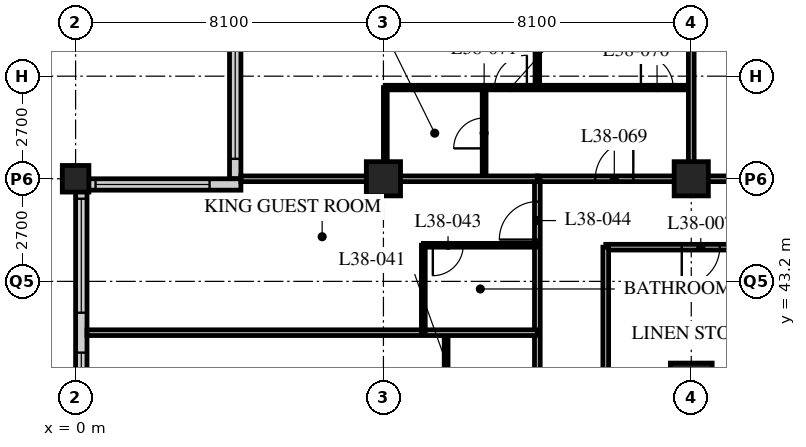
"""IFC4 building model, lengths in metres.
Left out: names, types, materials, properties, quantities, classifications, styles, units other than length and angle.
Written with IfcOpenShell. Run it as: python <this file> out.ifc"""

import sys

from ifc_helpers import new_model, si_unit, direction, frame, frame_2d, origin, origin_2d, place, context, subcontext, project, spatial, rectangle, hollow_rectangle, extrude, element, fill, save


model = new_model("IFC4")
c1 = context("Model", 3, precision=1e-05, world=origin(), true_north=direction((0.0, 1.0)))
c2 = subcontext(c1, "Body", "Model", "MODEL_VIEW")
j1 = project(units=[si_unit("LENGTHUNIT", "METRE"), si_unit("PLANEANGLEUNIT", "RADIAN")], contexts=[c1])
p1 = place(None, origin())
s1 = spatial("IfcSite", under=j1, at=p1, CompositionType="ELEMENT")
p2 = place(p1, origin())
s2 = spatial("IfcBuilding", under=s1, at=p2, CompositionType="ELEMENT")
p3 = place(p2, frame((0.0, 0.0, 147.6)))
s3 = spatial("IfcBuildingStorey", under=s2, at=p3, CompositionType="ELEMENT", Elevation=147.6)
p4 = place(p3, frame((0.0, 45.9, 0.0), z_axis=(0.0, 0.0, 1.0), x_axis=(1.0, 0.0, 0.0)))
e1 = element("IfcColumn", 1, at=p4, inside=s3, PredefinedType="COLUMN", context=c2, shape_type="SweptSolid", body=[
    extrude(hollow_rectangle(XDim=0.7, YDim=0.7, WallThickness=0.07, at=origin_2d()), origin(), (0.0, 0.0, 1.0), 3.4),
])
p5 = place(p3, frame((8.1, 45.9, 0.0), z_axis=(0.0, 0.0, 1.0), x_axis=(1.0, 0.0, 0.0)))
e2 = element("IfcColumn", 2, at=p5, inside=s3, PredefinedType="COLUMN", context=c2, shape_type="SweptSolid", body=[
    extrude(hollow_rectangle(XDim=0.9, YDim=0.9, WallThickness=0.1, at=origin_2d()), origin(), (0.0, 0.0, 1.0), 3.4),
])
p6 = place(p3, frame((16.2, 40.5, 0.0), z_axis=(0.0, 0.0, 1.0), x_axis=(1.0, 0.0, 0.0)))
e3 = element("IfcColumn", 3, at=p6, inside=s3, PredefinedType="COLUMN", context=c2, shape_type="SweptSolid", body=[
    extrude(hollow_rectangle(XDim=1.1, YDim=1.1, WallThickness=0.1, at=origin_2d()), origin(), (0.0, 0.0, 1.0), 3.4),
])
p7 = place(p3, frame((16.2, 45.9, 0.0), z_axis=(0.0, 0.0, 1.0), x_axis=(1.0, 0.0, 0.0)))
e4 = element("IfcColumn", 4, at=p7, inside=s3, PredefinedType="COLUMN", context=c2, shape_type="SweptSolid", body=[
    extrude(hollow_rectangle(XDim=0.9, YDim=0.9, WallThickness=0.1, at=origin_2d()), origin(), (0.0, 0.0, 1.0), 3.4),
])
p8 = place(p3, frame((4.2, 49.65, 0.0), z_axis=(0.0, 0.0, 1.0), x_axis=(0.0, -1.0, 0.0)))
e5 = element("IfcWall", 5, at=p8, inside=s3, PredefinedType="SOLIDWALL", context=c2, shape_type="SweptSolid", body=[
    extrude(rectangle(XDim=3.75, YDim=0.3, at=frame_2d((1.875, 0.0))), origin(), (0.0, 0.0, 1.0), 3.19),
])
p9 = place(p8, frame((0.225, 0.0, 0.9)))
e6 = element("IfcOpeningElement", 6, at=p9, cuts=e5, PredefinedType="OPENING", context=c2, shape_type="SweptSolid", body=[
    extrude(rectangle(XDim=3.0, YDim=1.4, at=frame_2d((1.5, 0.7))), frame((0.0, 0.16, 0.0), z_axis=(0.0, -1.0, 0.0), x_axis=(1.0, 0.0, 0.0)), (0.0, 0.0, 1.0), 0.32),
])
p10 = place(p3, frame((4.35, 45.75, 0.0), z_axis=(0.0, 0.0, 1.0), x_axis=(-1.0, 0.0, 0.0)))
e7 = element("IfcWall", 7, at=p10, inside=s3, PredefinedType="SOLIDWALL", context=c2, shape_type="SweptSolid", body=[
    extrude(rectangle(XDim=4.35, YDim=0.3, at=frame_2d((2.175, 0.0))), origin(), (0.0, 0.0, 1.0), 3.19),
])
p11 = place(p10, frame((0.825, 0.0, 0.9)))
e8 = element("IfcOpeningElement", 8, at=p11, cuts=e7, PredefinedType="OPENING", context=c2, shape_type="SweptSolid", body=[
    extrude(rectangle(XDim=3.0, YDim=1.4, at=frame_2d((1.5, 0.7))), frame((0.0, 0.16, 0.0), z_axis=(0.0, -1.0, 0.0), x_axis=(1.0, 0.0, 0.0)), (0.0, 0.0, 1.0), 0.32),
])
p12 = place(p3, frame((0.15, 45.6, 0.0), z_axis=(0.0, 0.0, 1.0), x_axis=(0.0, -1.0, 0.0)))
e9 = element("IfcWall", 9, at=p12, inside=s3, PredefinedType="SOLIDWALL", context=c2, shape_type="SweptSolid", body=[
    extrude(rectangle(XDim=32.1, YDim=0.3, at=frame_2d((16.05, 0.0))), origin(), (0.0, 0.0, 1.0), 3.19),
])
p13 = place(p12, frame((0.225, 0.0, 0.9)))
e10 = element("IfcOpeningElement", 10, at=p13, cuts=e9, PredefinedType="OPENING", context=c2, shape_type="SweptSolid", body=[
    extrude(rectangle(XDim=3.0, YDim=1.4, at=frame_2d((1.5, 0.7))), frame((0.0, 0.16, 0.0), z_axis=(0.0, -1.0, 0.0), x_axis=(1.0, 0.0, 0.0)), (0.0, 0.0, 1.0), 0.32),
])
p14 = place(p12, frame((4.275, 0.0, 0.9)))
e11 = element("IfcOpeningElement", 11, at=p14, cuts=e9, PredefinedType="OPENING", context=c2, shape_type="SweptSolid", body=[
    extrude(rectangle(XDim=3.0, YDim=1.4, at=frame_2d((1.5, 0.7))), frame((0.0, 0.16, 0.0), z_axis=(0.0, -1.0, 0.0), x_axis=(1.0, 0.0, 0.0)), (0.0, 0.0, 1.0), 0.32),
])
p15 = place(p12, frame((8.325, 0.0, 0.9)))
e12 = element("IfcOpeningElement", 12, at=p15, cuts=e9, PredefinedType="OPENING", context=c2, shape_type="SweptSolid", body=[
    extrude(rectangle(XDim=3.0, YDim=1.4, at=frame_2d((1.5, 0.7))), frame((0.0, 0.16, 0.0), z_axis=(0.0, -1.0, 0.0), x_axis=(1.0, 0.0, 0.0)), (0.0, 0.0, 1.0), 0.32),
])
p16 = place(p12, frame((12.375, 0.0, 0.9)))
e13 = element("IfcOpeningElement", 13, at=p16, cuts=e9, PredefinedType="OPENING", context=c2, shape_type="SweptSolid", body=[
    extrude(rectangle(XDim=3.0, YDim=1.4, at=frame_2d((1.5, 0.7))), frame((0.0, 0.16, 0.0), z_axis=(0.0, -1.0, 0.0), x_axis=(1.0, 0.0, 0.0)), (0.0, 0.0, 1.0), 0.32),
])
p17 = place(p12, frame((16.425, 0.0, 0.9)))
e14 = element("IfcOpeningElement", 14, at=p17, cuts=e9, PredefinedType="OPENING", context=c2, shape_type="SweptSolid", body=[
    extrude(rectangle(XDim=3.0, YDim=1.4, at=frame_2d((1.5, 0.7))), frame((0.0, 0.16, 0.0), z_axis=(0.0, -1.0, 0.0), x_axis=(1.0, 0.0, 0.0)), (0.0, 0.0, 1.0), 0.32),
])
p18 = place(p12, frame((20.475, 0.0, 0.9)))
e15 = element("IfcOpeningElement", 15, at=p18, cuts=e9, PredefinedType="OPENING", context=c2, shape_type="SweptSolid", body=[
    extrude(rectangle(XDim=3.0, YDim=1.4, at=frame_2d((1.5, 0.7))), frame((0.0, 0.16, 0.0), z_axis=(0.0, -1.0, 0.0), x_axis=(1.0, 0.0, 0.0)), (0.0, 0.0, 1.0), 0.32),
])
p19 = place(p12, frame((24.525, 0.0, 0.9)))
e16 = element("IfcOpeningElement", 16, at=p19, cuts=e9, PredefinedType="OPENING", context=c2, shape_type="SweptSolid", body=[
    extrude(rectangle(XDim=3.0, YDim=1.4, at=frame_2d((1.5, 0.7))), frame((0.0, 0.16, 0.0), z_axis=(0.0, -1.0, 0.0), x_axis=(1.0, 0.0, 0.0)), (0.0, 0.0, 1.0), 0.32),
])
p20 = place(p12, frame((28.575, 0.0, 0.9)))
e17 = element("IfcOpeningElement", 17, at=p20, cuts=e9, PredefinedType="OPENING", context=c2, shape_type="SweptSolid", body=[
    extrude(rectangle(XDim=3.0, YDim=1.4, at=frame_2d((1.5, 0.7))), frame((0.0, 0.16, 0.0), z_axis=(0.0, -1.0, 0.0), x_axis=(1.0, 0.0, 0.0)), (0.0, 0.0, 1.0), 0.32),
])
p21 = place(p3, frame((12.15, 45.9, 0.0), z_axis=(0.0, 0.0, 1.0), x_axis=(1.0, 0.0, 0.0)))
e18 = element("IfcWall", 18, at=p21, inside=s3, PredefinedType="PARTITIONING", context=c2, shape_type="SweptSolid", body=[
    extrude(rectangle(XDim=36.45, YDim=0.15, at=frame_2d((18.225, 0.0))), origin(), (0.0, 0.0, 1.0), 2.42),
])
p22 = place(p21, frame((9.225, 0.0, 0.0)))
e19 = element("IfcOpeningElement", 19, at=p22, cuts=e18, PredefinedType="OPENING", context=c2, shape_type="SweptSolid", body=[
    extrude(rectangle(XDim=1.8, YDim=2.4, at=frame_2d((0.9, 1.2))), frame((0.0, 0.085, 0.0), z_axis=(0.0, -1.0, 0.0), x_axis=(1.0, 0.0, 0.0)), (0.0, 0.0, 1.0), 0.17),
])
p23 = place(p21, frame((21.65, 0.0, 0.0)))
e20 = element("IfcOpeningElement", 20, at=p23, cuts=e18, PredefinedType="OPENING", context=c2, shape_type="SweptSolid", body=[
    extrude(rectangle(XDim=1.0, YDim=2.1, at=frame_2d((0.5, 1.05))), frame((0.0, 0.085, 0.0), z_axis=(0.0, -1.0, 0.0), x_axis=(1.0, 0.0, 0.0)), (0.0, 0.0, 1.0), 0.17),
])
p24 = place(p21, frame((24.9, 0.0, 0.0)))
e21 = element("IfcOpeningElement", 21, at=p24, cuts=e18, PredefinedType="OPENING", context=c2, shape_type="SweptSolid", body=[
    extrude(rectangle(XDim=1.0, YDim=2.1, at=frame_2d((0.5, 1.05))), frame((0.0, 0.085, 0.0), z_axis=(0.0, -1.0, 0.0), x_axis=(1.0, 0.0, 0.0)), (0.0, 0.0, 1.0), 0.17),
])
p25 = place(p21, frame((30.8, 0.0, 0.0)))
e22 = element("IfcOpeningElement", 22, at=p25, cuts=e18, PredefinedType="OPENING", context=c2, shape_type="SweptSolid", body=[
    extrude(rectangle(XDim=1.0, YDim=2.1, at=frame_2d((0.5, 1.05))), frame((0.0, 0.085, 0.0), z_axis=(0.0, -1.0, 0.0), x_axis=(1.0, 0.0, 0.0)), (0.0, 0.0, 1.0), 0.17),
])
p26 = place(p21, frame((32.825, 0.0, 0.0)))
e23 = element("IfcOpeningElement", 23, at=p26, cuts=e18, PredefinedType="OPENING", context=c2, shape_type="SweptSolid", body=[
    extrude(rectangle(XDim=1.0, YDim=2.1, at=frame_2d((0.5, 1.05))), frame((0.0, 0.085, 0.0), z_axis=(0.0, -1.0, 0.0), x_axis=(1.0, 0.0, 0.0)), (0.0, 0.0, 1.0), 0.17),
])
p27 = place(p21, frame((1.525, 0.0, 0.0)))
e24 = element("IfcOpeningElement", 24, at=p27, cuts=e18, PredefinedType="OPENING", context=c2, shape_type="SweptSolid", body=[
    extrude(rectangle(XDim=1.0, YDim=2.1, at=frame_2d((0.5, 1.05))), frame((0.0, 0.085, 0.0), z_axis=(0.0, -1.0, 0.0), x_axis=(1.0, 0.0, 0.0)), (0.0, 0.0, 1.0), 0.17),
])
p28 = place(p3, frame((12.15, 21.6, 0.0), z_axis=(0.0, 0.0, 1.0), x_axis=(0.0, 1.0, 0.0)))
e25 = element("IfcWall", 25, at=p28, inside=s3, PredefinedType="PARTITIONING", context=c2, shape_type="SweptSolid", body=[
    extrude(rectangle(XDim=24.3, YDim=0.15, at=frame_2d((12.15, 0.0))), origin(), (0.0, 0.0, 1.0), 3.19),
])
p29 = place(p28, frame((5.575, 0.0, 0.0)))
e26 = element("IfcOpeningElement", 26, at=p29, cuts=e25, PredefinedType="OPENING", context=c2, shape_type="SweptSolid", body=[
    extrude(rectangle(XDim=1.0, YDim=2.1, at=frame_2d((0.5, 1.05))), frame((0.0, 0.085, 0.0), z_axis=(0.0, -1.0, 0.0), x_axis=(1.0, 0.0, 0.0)), (0.0, 0.0, 1.0), 0.17),
])
p30 = place(p28, frame((14.05, 0.0, 0.0)))
e27 = element("IfcOpeningElement", 27, at=p30, cuts=e25, PredefinedType="OPENING", context=c2, shape_type="SweptSolid", body=[
    extrude(rectangle(XDim=1.0, YDim=2.1, at=frame_2d((0.5, 1.05))), frame((0.0, 0.085, 0.0), z_axis=(0.0, -1.0, 0.0), x_axis=(1.0, 0.0, 0.0)), (0.0, 0.0, 1.0), 0.17),
])
p31 = place(p28, frame((22.7, 0.0, 0.0)))
e28 = element("IfcOpeningElement", 28, at=p31, cuts=e25, PredefinedType="OPENING", context=c2, shape_type="SweptSolid", body=[
    extrude(rectangle(XDim=1.0, YDim=2.1, at=frame_2d((0.5, 1.05))), frame((0.0, 0.085, 0.0), z_axis=(0.0, -1.0, 0.0), x_axis=(1.0, 0.0, 0.0)), (0.0, 0.0, 1.0), 0.17),
])
p32 = place(p3, frame((27.14, 44.1, 0.0), z_axis=(0.0, 0.0, 1.0), x_axis=(-1.0, 0.0, 0.0)))
e29 = element("IfcWall", 29, at=p32, inside=s3, PredefinedType="PARTITIONING", context=c2, shape_type="SweptSolid", body=[
    extrude(rectangle(XDim=13.19, YDim=0.15, at=frame_2d((6.595, 0.0))), origin(), (0.0, 0.0, 1.0), 3.19),
])
p33 = place(p32, frame((10.19, 0.0, 0.0)))
e30 = element("IfcOpeningElement", 30, at=p33, cuts=e29, PredefinedType="OPENING", context=c2, shape_type="SweptSolid", body=[
    extrude(rectangle(XDim=1.0, YDim=2.1, at=frame_2d((0.5, 1.05))), frame((0.0, 0.085, 0.0), z_axis=(0.0, -1.0, 0.0), x_axis=(1.0, 0.0, 0.0)), (0.0, 0.0, 1.0), 0.17),
])
p34 = place(p32, frame((3.59, 0.0, 0.0)))
e31 = element("IfcOpeningElement", 31, at=p34, cuts=e29, PredefinedType="OPENING", context=c2, shape_type="SweptSolid", body=[
    extrude(rectangle(XDim=1.0, YDim=2.1, at=frame_2d((0.5, 1.05))), frame((0.0, 0.085, 0.0), z_axis=(0.0, -1.0, 0.0), x_axis=(1.0, 0.0, 0.0)), (0.0, 0.0, 1.0), 0.17),
])
p35 = place(p3, frame((13.95, 44.1, 0.0), z_axis=(0.0, 0.0, 1.0), x_axis=(0.0, -1.0, 0.0)))
e32 = element("IfcWall", 32, at=p35, inside=s3, PredefinedType="PARTITIONING", context=c2, shape_type="SweptSolid", body=[
    extrude(rectangle(XDim=19.8, YDim=0.15, at=frame_2d((9.9, 0.0))), origin(), (0.0, 0.0, 1.0), 3.19),
])
p36 = place(p35, frame((15.25, 0.0, 0.0)))
e33 = element("IfcOpeningElement", 33, at=p36, cuts=e32, PredefinedType="OPENING", context=c2, shape_type="SweptSolid", body=[
    extrude(rectangle(XDim=1.0, YDim=2.1, at=frame_2d((0.5, 1.05))), frame((0.0, 0.085, 0.0), z_axis=(0.0, -1.0, 0.0), x_axis=(1.0, 0.0, 0.0)), (0.0, 0.0, 1.0), 0.17),
])
p37 = place(p35, frame((7.15, 0.0, 0.0)))
e34 = element("IfcOpeningElement", 34, at=p37, cuts=e32, PredefinedType="OPENING", context=c2, shape_type="SweptSolid", body=[
    extrude(rectangle(XDim=1.0, YDim=2.1, at=frame_2d((0.5, 1.05))), frame((0.0, 0.085, 0.0), z_axis=(0.0, -1.0, 0.0), x_axis=(1.0, 0.0, 0.0)), (0.0, 0.0, 1.0), 0.17),
])
p38 = place(p3, frame((9.75, 39.25, 0.0), z_axis=(0.0, 0.0, 1.0), x_axis=(0.0, 1.0, 0.0)))
e35 = element("IfcWall", 35, at=p38, inside=s3, PredefinedType="PARTITIONING", context=c2, shape_type="SweptSolid", body=[
    extrude(rectangle(XDim=2.6, YDim=0.1, at=frame_2d((1.3, 0.0))), origin(), (0.0, 0.0, 1.0), 3.19),
])
p39 = place(p3, frame((12.15, 41.85, 0.0), z_axis=(0.0, 0.0, 1.0), x_axis=(-1.0, 0.0, 0.0)))
e36 = element("IfcWall", 36, at=p39, inside=s3, PredefinedType="PARTITIONING", context=c2, shape_type="SweptSolid", body=[
    extrude(rectangle(XDim=11.85, YDim=0.15, at=frame_2d((5.925, 0.0))), origin(), (0.0, 0.0, 1.0), 3.19),
])
p40 = place(p3, frame((9.15, 41.85, 0.0), z_axis=(0.0, 0.0, 1.0), x_axis=(0.0, 1.0, 0.0)))
e37 = element("IfcWall", 37, at=p40, inside=s3, PredefinedType="PARTITIONING", context=c2, shape_type="SweptSolid", body=[
    extrude(rectangle(XDim=2.3, YDim=0.1, at=frame_2d((1.15, 0.0))), origin(), (0.0, 0.0, 1.0), 3.19),
])
p41 = place(p3, frame((12.15, 44.15, 0.0), z_axis=(0.0, 0.0, 1.0), x_axis=(-1.0, 0.0, 0.0)))
e38 = element("IfcWall", 38, at=p41, inside=s3, PredefinedType="PARTITIONING", context=c2, shape_type="SweptSolid", body=[
    extrude(rectangle(XDim=3.0, YDim=0.1, at=frame_2d((1.5, 0.0))), origin(), (0.0, 0.0, 1.0), 3.19),
])
p42 = place(p41, frame((1.95, 0.0, 0.0)))
e39 = element("IfcOpeningElement", 39, at=p42, cuts=e38, PredefinedType="OPENING", context=c2, shape_type="SweptSolid", body=[
    extrude(rectangle(XDim=0.8, YDim=2.1, at=frame_2d((0.4, 1.05))), frame((0.0, 0.06, 0.0), z_axis=(0.0, -1.0, 0.0), x_axis=(1.0, 0.0, 0.0)), (0.0, 0.0, 1.0), 0.12),
])
p43 = place(p3, frame((10.75, 45.9, 0.0), z_axis=(0.0, 0.0, 1.0), x_axis=(0.0, 1.0, 0.0)))
e40 = element("IfcWall", 40, at=p43, inside=s3, PredefinedType="PARTITIONING", context=c2, shape_type="SweptSolid", body=[
    extrude(rectangle(XDim=2.4, YDim=0.1, at=frame_2d((1.2, 0.0))), origin(), (0.0, 0.0, 1.0), 3.19),
])
p44 = place(p43, frame((0.8, 0.0, 0.0)))
e41 = element("IfcOpeningElement", 41, at=p44, cuts=e40, PredefinedType="OPENING", context=c2, shape_type="SweptSolid", body=[
    extrude(rectangle(XDim=0.8, YDim=2.1, at=frame_2d((0.4, 1.05))), frame((0.0, 0.06, 0.0), z_axis=(0.0, -1.0, 0.0), x_axis=(1.0, 0.0, 0.0)), (0.0, 0.0, 1.0), 0.12),
])
p45 = place(p3, frame((8.15, 45.9, 0.0), z_axis=(0.0, 0.0, 1.0), x_axis=(0.0, 1.0, 0.0)))
e42 = element("IfcWall", 42, at=p45, inside=s3, PredefinedType="PARTITIONING", context=c2, shape_type="SweptSolid", body=[
    extrude(rectangle(XDim=2.4, YDim=0.1, at=frame_2d((1.2, 0.0))), origin(), (0.0, 0.0, 1.0), 2.42),
])
p46 = place(p3, frame((8.15, 48.3, 0.0), z_axis=(0.0, 0.0, 1.0), x_axis=(1.0, 0.0, 0.0)))
e43 = element("IfcWall", 43, at=p46, inside=s3, PredefinedType="PARTITIONING", context=c2, shape_type="SweptSolid", body=[
    extrude(rectangle(XDim=8.05, YDim=0.12, at=frame_2d((4.025, 0.0))), origin(), (0.0, 0.0, 1.0), 3.19),
])
p47 = place(p46, frame((6.725, 0.0, 0.0)))
e44 = element("IfcOpeningElement", 44, at=p47, cuts=e43, PredefinedType="OPENING", context=c2, shape_type="SweptSolid", body=[
    extrude(rectangle(XDim=0.85, YDim=2.1, at=frame_2d((0.425, 1.05))), frame((0.0, 0.07, 0.0), z_axis=(0.0, -1.0, 0.0), x_axis=(1.0, 0.0, 0.0)), (0.0, 0.0, 1.0), 0.14),
])
p48 = place(p46, frame((2.875, 0.0, 0.0)))
e45 = element("IfcOpeningElement", 45, at=p48, cuts=e43, PredefinedType="OPENING", context=c2, shape_type="SweptSolid", body=[
    extrude(rectangle(XDim=0.85, YDim=2.1, at=frame_2d((0.425, 1.05))), frame((0.0, 0.07, 0.0), z_axis=(0.0, -1.0, 0.0), x_axis=(1.0, 0.0, 0.0)), (0.0, 0.0, 1.0), 0.14),
])
p49 = place(p3, frame((12.15, 48.3, 0.0), z_axis=(0.0, 0.0, 1.0), x_axis=(0.0, 1.0, 0.0)))
e46 = element("IfcWall", 46, at=p49, inside=s3, PredefinedType="PARTITIONING", context=c2, shape_type="SweptSolid", body=[
    extrude(rectangle(XDim=5.4, YDim=0.12, at=frame_2d((2.7, 0.0))), origin(), (0.0, 0.0, 1.0), 3.19),
])
p50 = place(p3, frame((4.35, 45.9, 0.0), z_axis=(0.0, 0.0, 1.0), x_axis=(1.0, 0.0, 0.0)))
e47 = element("IfcWall", 47, at=p50, inside=s3, PredefinedType="PARTITIONING", context=c2, shape_type="SweptSolid", body=[
    extrude(rectangle(XDim=7.8, YDim=0.15, at=frame_2d((3.9, 0.0))), origin(), (0.0, 0.0, 1.0), 2.42),
])
p51 = place(p3, frame((16.2, 45.9, 0.0), z_axis=(0.0, 0.0, 1.0), x_axis=(0.0, 1.0, 0.0)))
e48 = element("IfcWall", 48, at=p51, inside=s3, PredefinedType="PARTITIONING", context=c2, shape_type="SweptSolid", body=[
    extrude(rectangle(XDim=7.8, YDim=0.15, at=frame_2d((3.9, 0.0))), origin(), (0.0, 0.0, 1.0), 2.42),
])
p52 = place(p9, origin())
e49 = element("IfcWindow", 49, at=p52, inside=s3, PartitioningType="SINGLE_PANEL", PredefinedType="WINDOW", context=c2, shape_type="SweptSolid", body=[
    extrude(rectangle(XDim=3.0, YDim=1.4, at=frame_2d((1.5, 0.7))), frame((0.0, 0.03, 0.0), z_axis=(0.0, -1.0, 0.0), x_axis=(1.0, 0.0, 0.0)), (0.0, 0.0, 1.0), 0.06),
])
fill(e6, e49)
p53 = place(p11, origin())
e50 = element("IfcWindow", 50, at=p53, inside=s3, PartitioningType="SINGLE_PANEL", PredefinedType="WINDOW", context=c2, shape_type="SweptSolid", body=[
    extrude(rectangle(XDim=3.0, YDim=1.4, at=frame_2d((1.5, 0.7))), frame((0.0, 0.03, 0.0), z_axis=(0.0, -1.0, 0.0), x_axis=(1.0, 0.0, 0.0)), (0.0, 0.0, 1.0), 0.06),
])
fill(e8, e50)
p54 = place(p13, origin())
e51 = element("IfcWindow", 51, at=p54, inside=s3, PartitioningType="SINGLE_PANEL", PredefinedType="WINDOW", context=c2, shape_type="SweptSolid", body=[
    extrude(rectangle(XDim=3.0, YDim=1.4, at=frame_2d((1.5, 0.7))), frame((0.0, 0.03, 0.0), z_axis=(0.0, -1.0, 0.0), x_axis=(1.0, 0.0, 0.0)), (0.0, 0.0, 1.0), 0.06),
])
fill(e10, e51)
p55 = place(p14, origin())
e52 = element("IfcWindow", 52, at=p55, inside=s3, PartitioningType="SINGLE_PANEL", PredefinedType="WINDOW", context=c2, shape_type="SweptSolid", body=[
    extrude(rectangle(XDim=3.0, YDim=1.4, at=frame_2d((1.5, 0.7))), frame((0.0, 0.03, 0.0), z_axis=(0.0, -1.0, 0.0), x_axis=(1.0, 0.0, 0.0)), (0.0, 0.0, 1.0), 0.06),
])
fill(e11, e52)
p56 = place(p33, origin())
e53 = element("IfcDoor", 53, at=p56, inside=s3, OperationType="SINGLE_SWING_RIGHT", PredefinedType="DOOR", context=c2, shape_type="SweptSolid", body=[
    extrude(rectangle(XDim=1.0, YDim=2.1, at=frame_2d((0.5, 1.05))), frame((0.0, 0.025, 0.0), z_axis=(0.0, -1.0, 0.0), x_axis=(1.0, 0.0, 0.0)), (0.0, 0.0, 1.0), 0.05),
])
fill(e30, e53)
p57 = place(p42, origin())
e54 = element("IfcDoor", 54, at=p57, inside=s3, OperationType="SINGLE_SWING_RIGHT", PredefinedType="DOOR", context=c2, shape_type="SweptSolid", body=[
    extrude(rectangle(XDim=0.8, YDim=2.1, at=frame_2d((0.4, 1.05))), frame((0.0, 0.025, 0.0), z_axis=(0.0, -1.0, 0.0), x_axis=(1.0, 0.0, 0.0)), (0.0, 0.0, 1.0), 0.05),
])
fill(e39, e54)
p58 = place(p31, origin())
e55 = element("IfcDoor", 55, at=p58, inside=s3, OperationType="SINGLE_SWING_LEFT", PredefinedType="DOOR", context=c2, shape_type="SweptSolid", body=[
    extrude(rectangle(XDim=1.0, YDim=2.1, at=frame_2d((0.5, 1.05))), frame((0.0, 0.025, 0.0), z_axis=(0.0, -1.0, 0.0), x_axis=(1.0, 0.0, 0.0)), (0.0, 0.0, 1.0), 0.05),
])
fill(e28, e55)
p59 = place(p27, origin())
e56 = element("IfcDoor", 56, at=p59, inside=s3, OperationType="SINGLE_SWING_RIGHT", PredefinedType="DOOR", context=c2, shape_type="SweptSolid", body=[
    extrude(rectangle(XDim=1.0, YDim=2.1, at=frame_2d((0.5, 1.05))), frame((0.0, 0.025, 0.0), z_axis=(0.0, -1.0, 0.0), x_axis=(1.0, 0.0, 0.0)), (0.0, 0.0, 1.0), 0.05),
])
fill(e24, e56)
p60 = place(p47, origin())
e57 = element("IfcDoor", 57, at=p60, inside=s3, OperationType="SINGLE_SWING_LEFT", PredefinedType="DOOR", context=c2, shape_type="SweptSolid", body=[
    extrude(rectangle(XDim=0.85, YDim=2.1, at=frame_2d((0.425, 1.05))), frame((0.0, 0.025, 0.0), z_axis=(0.0, -1.0, 0.0), x_axis=(1.0, 0.0, 0.0)), (0.0, 0.0, 1.0), 0.05),
])
fill(e44, e57)
p61 = place(p44, origin())
e58 = element("IfcDoor", 58, at=p61, inside=s3, OperationType="SINGLE_SWING_LEFT", PredefinedType="DOOR", context=c2, shape_type="SweptSolid", body=[
    extrude(rectangle(XDim=0.8, YDim=2.1, at=frame_2d((0.4, 1.05))), frame((0.0, 0.025, 0.0), z_axis=(0.0, -1.0, 0.0), x_axis=(1.0, 0.0, 0.0)), (0.0, 0.0, 1.0), 0.05),
])
fill(e41, e58)
p62 = place(p48, origin())
e59 = element("IfcDoor", 59, at=p62, inside=s3, OperationType="SINGLE_SWING_RIGHT", PredefinedType="DOOR", context=c2, shape_type="SweptSolid", body=[
    extrude(rectangle(XDim=0.85, YDim=2.1, at=frame_2d((0.425, 1.05))), frame((0.0, 0.025, 0.0), z_axis=(0.0, -1.0, 0.0), x_axis=(1.0, 0.0, 0.0)), (0.0, 0.0, 1.0), 0.05),
])
fill(e45, e59)
save(model, sys.argv[1])
